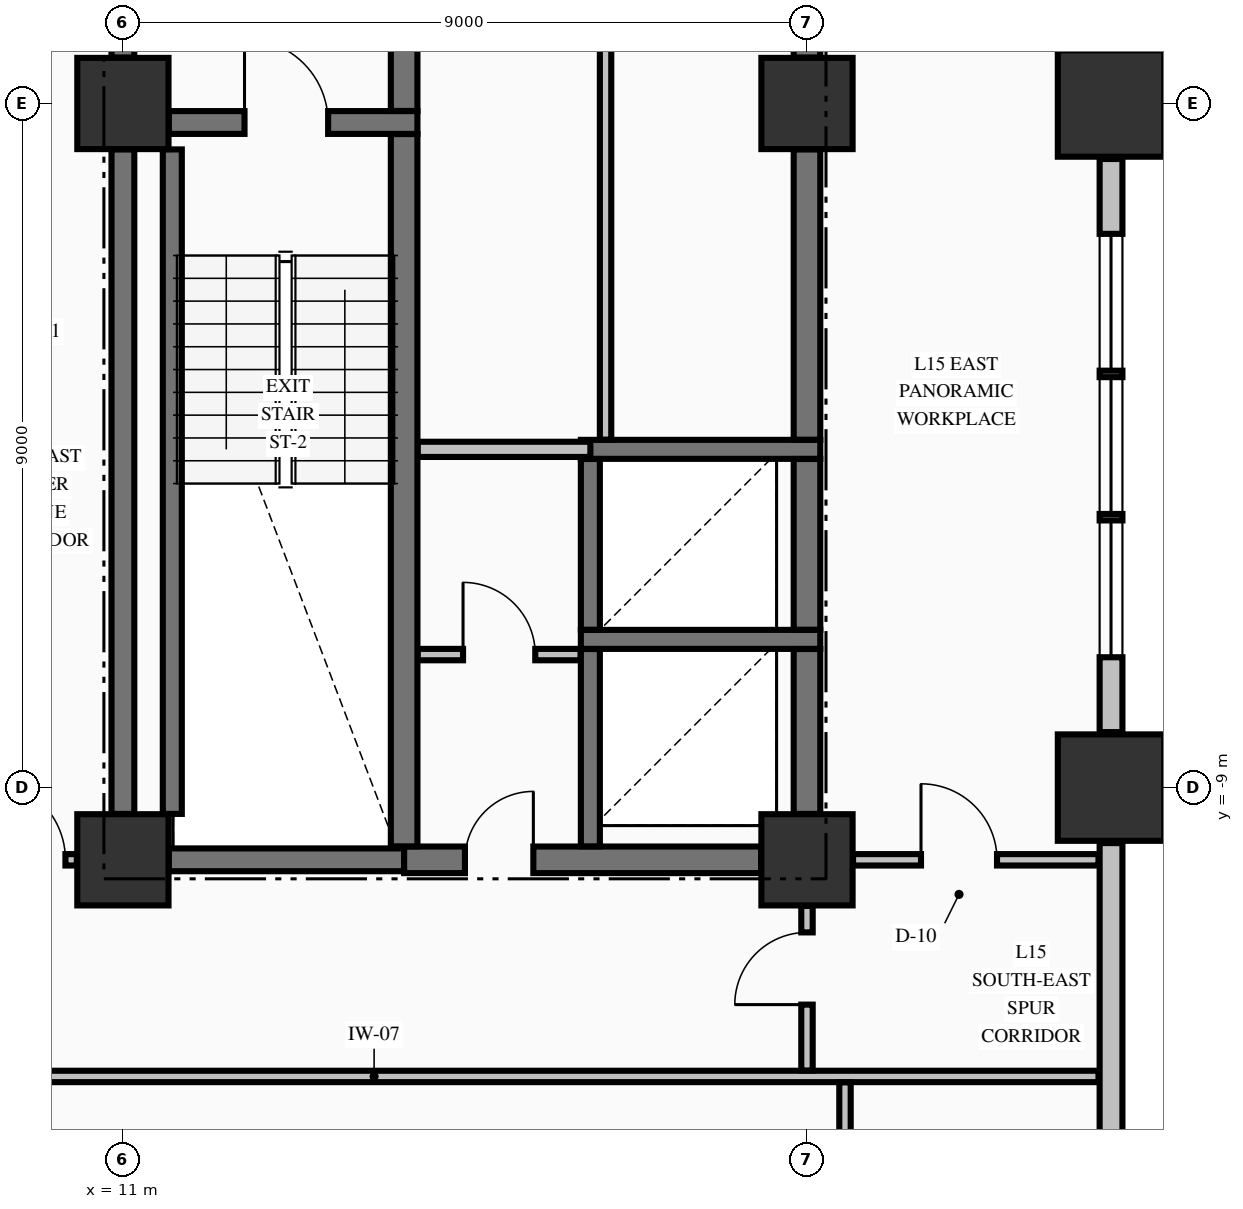
"""IFC4 building model, lengths in metres.
Left out: names, types, materials, properties, quantities, classifications, styles, units other than length and angle.
Written with IfcOpenShell. Run it as: python <this file> out.ifc"""

import sys

from ifc_helpers import new_model, si_unit, direction, frame, frame_2d, origin, origin_2d, place, context, subcontext, project, spatial, rectangle, extrude, element, fill, save


model = new_model("IFC4")
c1 = context("Model", 3, precision=1e-05, world=origin(), true_north=direction((0.0, 1.0)))
c2 = subcontext(c1, "Body", "Model", "MODEL_VIEW")
j1 = project(units=[si_unit("LENGTHUNIT", "METRE"), si_unit("PLANEANGLEUNIT", "RADIAN")], contexts=[c1])
p1 = place(None, origin())
s1 = spatial("IfcSite", under=j1, at=p1, CompositionType="ELEMENT")
p2 = place(p1, origin())
s2 = spatial("IfcBuilding", under=s1, at=p2, CompositionType="ELEMENT")
p3 = place(p2, frame((0.0, 0.0, 64.33)))
s3 = spatial("IfcBuildingStorey", under=s2, at=p3, CompositionType="ELEMENT", Elevation=64.33)
for number, where, z_axis, x_axis in (
    (1, (24.0, -9.0, -0.25), (0.0, 0.0, 1.0), (1.0, 0.0, 0.0)),
    (2, (24.0, 0.0, -0.25), (0.0, 0.0, 1.0), (1.0, 0.0, 0.0)),
):
    element("IfcColumn", number, at=place(p3, frame(where, z_axis=z_axis, x_axis=x_axis)), inside=s3, PredefinedType="COLUMN", context=c2, shape_type="SweptSolid", body=[
        extrude(rectangle(XDim=1.4, YDim=1.4, at=origin_2d()), origin(), (0.0, 0.0, 1.0), 3.57),
    ])
for number, where, z_axis, x_axis in (
    (3, (11.0, -9.95, -0.25), (0.0, 0.0, 1.0), (1.0, 0.0, 0.0)),
    (4, (11.0, 0.0, -0.25), (0.0, 0.0, 1.0), (1.0, 0.0, 0.0)),
    (5, (20.0, -9.95, -0.25), (0.0, 0.0, 1.0), (1.0, 0.0, 0.0)),
    (6, (20.0, 0.0, -0.25), (0.0, 0.0, 1.0), (1.0, 0.0, 0.0)),
):
    element("IfcColumn", number, at=place(p3, frame(where, z_axis=z_axis, x_axis=x_axis)), inside=s3, PredefinedType="COLUMN", context=c2, shape_type="SweptSolid", body=[
        extrude(rectangle(XDim=1.2, YDim=1.2, at=origin_2d()), origin(), (0.0, 0.0, 1.0), 3.57),
    ])
p4 = place(p3, frame((24.0, -22.27, 0.0), z_axis=(0.0, 0.0, 1.0), x_axis=(0.0, 1.0, 0.0)))
e7 = element("IfcWall", 7, at=p4, inside=s3, PredefinedType="STANDARD", context=c2, shape_type="SweptSolid", body=[
    extrude(rectangle(XDim=12.54, YDim=0.3, at=frame_2d((6.27, 0.0))), origin(), (0.0, 0.0, 1.0), 2.712),
])
p5 = place(p3, frame((24.0, -8.27, 0.0), z_axis=(0.0, 0.0, 1.0), x_axis=(0.0, 1.0, 0.0)))
e8 = element("IfcWall", 8, at=p5, inside=s3, PredefinedType="STANDARD", context=c2, shape_type="SweptSolid", body=[
    extrude(rectangle(XDim=7.54, YDim=0.3, at=frame_2d((3.77, 0.0))), origin(), (0.0, 0.0, 1.0), 2.712),
])
p6 = place(p5, frame((0.985, 0.0, 0.78)))
e9 = element("IfcOpeningElement", 9, at=p6, cuts=e8, PredefinedType="OPENING", context=c2, shape_type="SweptSolid", body=[
    extrude(rectangle(XDim=1.8, YDim=1.72, at=frame_2d((0.9, 0.86))), frame((0.0, 0.16, 0.0), z_axis=(0.0, -1.0, 0.0), x_axis=(1.0, 0.0, 0.0)), (0.0, 0.0, 1.0), 0.32),
])
p7 = place(p5, frame((2.87, 0.0, 0.78)))
e10 = element("IfcOpeningElement", 10, at=p7, cuts=e8, PredefinedType="OPENING", context=c2, shape_type="SweptSolid", body=[
    extrude(rectangle(XDim=1.8, YDim=1.72, at=frame_2d((0.9, 0.86))), frame((0.0, 0.16, 0.0), z_axis=(0.0, -1.0, 0.0), x_axis=(1.0, 0.0, 0.0)), (0.0, 0.0, 1.0), 0.32),
])
p8 = place(p5, frame((4.755, 0.0, 0.78)))
e11 = element("IfcOpeningElement", 11, at=p8, cuts=e8, PredefinedType="OPENING", context=c2, shape_type="SweptSolid", body=[
    extrude(rectangle(XDim=1.8, YDim=1.72, at=frame_2d((0.9, 0.86))), frame((0.0, 0.16, 0.0), z_axis=(0.0, -1.0, 0.0), x_axis=(1.0, 0.0, 0.0)), (0.0, 0.0, 1.0), 0.32),
])
p9 = place(p3, frame((11.604, -9.95, 0.0), z_axis=(0.0, 0.0, 1.0), x_axis=(1.0, 0.0, 0.0)))
e12 = element("IfcWall", 12, at=p9, inside=s3, PredefinedType="SHEAR", context=c2, shape_type="SweptSolid", body=[
    extrude(rectangle(XDim=3.096, YDim=0.3, at=frame_2d((1.548, 0.0))), origin(), (0.0, 0.0, 1.0), 3.32),
])
p10 = place(p3, frame((14.7, -9.95, 0.0), z_axis=(0.0, 0.0, 1.0), x_axis=(1.0, 0.0, 0.0)))
e13 = element("IfcWall", 13, at=p10, inside=s3, PredefinedType="SHEAR", context=c2, shape_type="SweptSolid", body=[
    extrude(rectangle(XDim=4.696, YDim=0.35, at=frame_2d((2.348, 0.0))), origin(), (0.0, 0.0, 1.0), 3.32),
])
p11 = place(p10, frame((0.8, 0.0, 0.0)))
e14 = element("IfcOpeningElement", 14, at=p11, cuts=e13, PredefinedType="OPENING", context=c2, shape_type="SweptSolid", body=[
    extrude(rectangle(XDim=0.9, YDim=2.15, at=frame_2d((0.45, 1.075))), frame((0.0, 0.185, 0.0), z_axis=(0.0, -1.0, 0.0), x_axis=(1.0, 0.0, 0.0)), (0.0, 0.0, 1.0), 0.37),
])
for number, where, z_axis, x_axis in (
    (15, (17.025, -7.05, 0.0), (0.0, 0.0, 1.0), (1.0, 0.0, 0.0)),
    (16, (17.025, -4.55, 0.0), (0.0, 0.0, 1.0), (1.0, 0.0, 0.0)),
):
    element("IfcWall", number, at=place(p3, frame(where, z_axis=z_axis, x_axis=x_axis)), inside=s3, PredefinedType="SOLIDWALL", context=c2, shape_type="SweptSolid", body=[
        extrude(rectangle(XDim=3.15, YDim=0.25, at=frame_2d((1.575, 0.0))), origin(), (0.0, 0.0, 1.0), 3.32),
    ])
p12 = place(p3, frame((11.604, -0.25, 0.0), z_axis=(0.0, 0.0, 1.0), x_axis=(1.0, 0.0, 0.0)))
e17 = element("IfcWall", 17, at=p12, inside=s3, PredefinedType="SHEAR", context=c2, shape_type="SweptSolid", body=[
    extrude(rectangle(XDim=3.271, YDim=0.3, at=frame_2d((1.635, 0.0))), origin(), (0.0, 0.0, 1.0), 3.32),
])
p13 = place(p12, frame((0.996, 0.0, 0.0)))
e18 = element("IfcOpeningElement", 18, at=p13, cuts=e17, PredefinedType="OPENING", context=c2, shape_type="SweptSolid", body=[
    extrude(rectangle(XDim=1.1, YDim=2.15, at=frame_2d((0.55, 1.075))), frame((0.0, 0.16, 0.0), z_axis=(0.0, -1.0, 0.0), x_axis=(1.0, 0.0, 0.0)), (0.0, 0.0, 1.0), 0.32),
])
p14 = place(p3, frame((-28.835, -12.8, 0.0), z_axis=(0.0, 0.0, 1.0), x_axis=(1.0, 0.0, 0.0)))
e19 = element("IfcWall", 19, at=p14, inside=s3, PredefinedType="PARTITIONING", context=c2, shape_type="SweptSolid", body=[
    extrude(rectangle(XDim=52.67, YDim=0.15, at=frame_2d((26.335, 0.0))), origin(), (0.0, 0.0, 1.0), 3.32),
])
p15 = place(p14, frame((13.81, 0.0, 0.0)))
e20 = element("IfcOpeningElement", 20, at=p15, cuts=e19, PredefinedType="OPENING", context=c2, shape_type="SweptSolid", body=[
    extrude(rectangle(XDim=1.05, YDim=2.15, at=frame_2d((0.525, 1.075))), frame((0.0, 0.085, 0.0), z_axis=(0.0, -1.0, 0.0), x_axis=(1.0, 0.0, 0.0)), (0.0, 0.0, 1.0), 0.17),
])
p16 = place(p14, frame((25.01, 0.0, 0.0)))
e21 = element("IfcOpeningElement", 21, at=p16, cuts=e19, PredefinedType="OPENING", context=c2, shape_type="SweptSolid", body=[
    extrude(rectangle(XDim=1.05, YDim=2.15, at=frame_2d((0.525, 1.075))), frame((0.0, 0.085, 0.0), z_axis=(0.0, -1.0, 0.0), x_axis=(1.0, 0.0, 0.0)), (0.0, 0.0, 1.0), 0.17),
])
p17 = place(p14, frame((32.56, 0.0, 0.0)))
e22 = element("IfcOpeningElement", 22, at=p17, cuts=e19, PredefinedType="OPENING", context=c2, shape_type="SweptSolid", body=[
    extrude(rectangle(XDim=1.05, YDim=2.15, at=frame_2d((0.525, 1.075))), frame((0.0, 0.085, 0.0), z_axis=(0.0, -1.0, 0.0), x_axis=(1.0, 0.0, 0.0)), (0.0, 0.0, 1.0), 0.17),
])
p18 = place(p3, frame((-10.394, -9.95, 0.0), z_axis=(0.0, 0.0, 1.0), x_axis=(1.0, 0.0, 0.0)))
e23 = element("IfcWall", 23, at=p18, inside=s3, PredefinedType="PARTITIONING", context=c2, shape_type="SweptSolid", body=[
    extrude(rectangle(XDim=20.788, YDim=0.15, at=frame_2d((10.394, 0.0))), origin(), (0.0, 0.0, 1.0), 3.32),
])
p19 = place(p18, frame((0.15, 0.0, 0.0)))
e24 = element("IfcOpeningElement", 24, at=p19, cuts=e23, PredefinedType="OPENING", context=c2, shape_type="SweptSolid", body=[
    extrude(rectangle(XDim=1.05, YDim=2.15, at=frame_2d((0.525, 1.075))), frame((0.0, 0.085, 0.0), z_axis=(0.0, -1.0, 0.0), x_axis=(1.0, 0.0, 0.0)), (0.0, 0.0, 1.0), 0.17),
])
p20 = place(p18, frame((19.588, 0.0, 0.0)))
e25 = element("IfcOpeningElement", 25, at=p20, cuts=e23, PredefinedType="OPENING", context=c2, shape_type="SweptSolid", body=[
    extrude(rectangle(XDim=1.05, YDim=2.15, at=frame_2d((0.525, 1.075))), frame((0.0, 0.085, 0.0), z_axis=(0.0, -1.0, 0.0), x_axis=(1.0, 0.0, 0.0)), (0.0, 0.0, 1.0), 0.17),
])
p21 = place(p18, frame((13.769, 0.0, 0.0)))
e26 = element("IfcOpeningElement", 26, at=p21, cuts=e23, PredefinedType="OPENING", context=c2, shape_type="SweptSolid", body=[
    extrude(rectangle(XDim=0.95, YDim=2.15, at=frame_2d((0.475, 1.075))), frame((0.0, 0.085, 0.0), z_axis=(0.0, -1.0, 0.0), x_axis=(1.0, 0.0, 0.0)), (0.0, 0.0, 1.0), 0.17),
])
p22 = place(p3, frame((20.606, -9.95, 0.0), z_axis=(0.0, 0.0, 1.0), x_axis=(1.0, 0.0, 0.0)))
e27 = element("IfcWall", 27, at=p22, inside=s3, PredefinedType="PARTITIONING", context=c2, shape_type="SweptSolid", body=[
    extrude(rectangle(XDim=3.229, YDim=0.15, at=frame_2d((1.615, 0.0))), origin(), (0.0, 0.0, 1.0), 3.32),
])
p23 = place(p22, frame((0.894, 0.0, 0.0)))
e28 = element("IfcOpeningElement", 28, at=p23, cuts=e27, PredefinedType="OPENING", context=c2, shape_type="SweptSolid", body=[
    extrude(rectangle(XDim=1.0, YDim=2.15, at=frame_2d((0.5, 1.075))), frame((0.0, 0.085, 0.0), z_axis=(0.0, -1.0, 0.0), x_axis=(1.0, 0.0, 0.0)), (0.0, 0.0, 1.0), 0.17),
])
p24 = place(p3, frame((14.878, -7.25, 0.0), z_axis=(0.0, 0.0, 1.0), x_axis=(1.0, 0.0, 0.0)))
e29 = element("IfcWall", 29, at=p24, inside=s3, PredefinedType="PARTITIONING", context=c2, shape_type="SweptSolid", body=[
    extrude(rectangle(XDim=2.144, YDim=0.15, at=frame_2d((1.072, 0.0))), origin(), (0.0, 0.0, 1.0), 3.32),
])
p25 = place(p24, frame((0.597, 0.0, 0.0)))
e30 = element("IfcOpeningElement", 30, at=p25, cuts=e29, PredefinedType="OPENING", context=c2, shape_type="SweptSolid", body=[
    extrude(rectangle(XDim=0.95, YDim=2.15, at=frame_2d((0.475, 1.075))), frame((0.0, 0.085, 0.0), z_axis=(0.0, -1.0, 0.0), x_axis=(1.0, 0.0, 0.0)), (0.0, 0.0, 1.0), 0.17),
])
p26 = place(p3, frame((14.878, -4.55, 0.0), z_axis=(0.0, 0.0, 1.0), x_axis=(1.0, 0.0, 0.0)))
e31 = element("IfcWall", 31, at=p26, inside=s3, PredefinedType="PARTITIONING", context=c2, shape_type="SweptSolid", body=[
    extrude(rectangle(XDim=2.272, YDim=0.2, at=frame_2d((1.136, 0.0))), origin(), (0.0, 0.0, 1.0), 3.32),
])
p27 = place(p3, frame((11.0, -9.346, 0.0), z_axis=(0.0, 0.0, 1.0), x_axis=(0.0, 1.0, 0.0)))
e32 = element("IfcWall", 32, at=p27, inside=s3, PredefinedType="SHEAR", context=c2, shape_type="SweptSolid", body=[
    extrude(rectangle(XDim=8.742, YDim=0.3, at=frame_2d((4.371, 0.0))), origin(), (0.0, 0.0, 1.0), 3.32),
])
p28 = place(p3, frame((11.0, 0.604, 0.0), z_axis=(0.0, 0.0, 1.0), x_axis=(0.0, 1.0, 0.0)))
e33 = element("IfcWall", 33, at=p28, inside=s3, PredefinedType="SHEAR", context=c2, shape_type="SweptSolid", body=[
    extrude(rectangle(XDim=2.144, YDim=0.3, at=frame_2d((1.072, 0.0))), origin(), (0.0, 0.0, 1.0), 3.32),
])
p29 = place(p28, frame((0.496, 0.0, 0.0)))
e34 = element("IfcOpeningElement", 34, at=p29, cuts=e33, PredefinedType="OPENING", context=c2, shape_type="SweptSolid", body=[
    extrude(rectangle(XDim=1.1, YDim=2.15, at=frame_2d((0.55, 1.075))), frame((0.0, 0.16, 0.0), z_axis=(0.0, -1.0, 0.0), x_axis=(1.0, 0.0, 0.0)), (0.0, 0.0, 1.0), 0.32),
])
p30 = place(p3, frame((11.65, -9.346, 0.0), z_axis=(0.0, 0.0, 1.0), x_axis=(0.0, 1.0, 0.0)))
e35 = element("IfcWall", 35, at=p30, inside=s3, PredefinedType="SOLIDWALL", context=c2, shape_type="SweptSolid", body=[
    extrude(rectangle(XDim=8.742, YDim=0.25, at=frame_2d((4.371, 0.0))), origin(), (0.0, 0.0, 1.0), 3.32),
])
p31 = place(p3, frame((14.7, -9.773, 0.0), z_axis=(0.0, 0.0, 1.0), x_axis=(0.0, 1.0, 0.0)))
e36 = element("IfcWall", 36, at=p31, inside=s3, PredefinedType="SHEAR", context=c2, shape_type="SweptSolid", body=[
    extrude(rectangle(XDim=9.371, YDim=0.35, at=frame_2d((4.686, 0.0))), origin(), (0.0, 0.0, 1.0), 3.32),
])
p32 = place(p3, frame((14.7, -0.098, 0.0), z_axis=(0.0, 0.0, 1.0), x_axis=(0.0, 1.0, 0.0)))
e37 = element("IfcWall", 37, at=p32, inside=s3, PredefinedType="SHEAR", context=c2, shape_type="SweptSolid", body=[
    extrude(rectangle(XDim=2.846, YDim=0.35, at=frame_2d((1.423, 0.0))), origin(), (0.0, 0.0, 1.0), 3.32),
])
p33 = place(p3, frame((17.15, -9.773, 0.0), z_axis=(0.0, 0.0, 1.0), x_axis=(0.0, 1.0, 0.0)))
e38 = element("IfcWall", 38, at=p33, inside=s3, PredefinedType="SOLIDWALL", context=c2, shape_type="SweptSolid", body=[
    extrude(rectangle(XDim=2.596, YDim=0.25, at=frame_2d((1.298, 0.0))), origin(), (0.0, 0.0, 1.0), 3.32),
])
p34 = place(p3, frame((17.15, -6.923, 0.0), z_axis=(0.0, 0.0, 1.0), x_axis=(0.0, 1.0, 0.0)))
e39 = element("IfcWall", 39, at=p34, inside=s3, PredefinedType="SOLIDWALL", context=c2, shape_type="SweptSolid", body=[
    extrude(rectangle(XDim=2.246, YDim=0.25, at=frame_2d((1.123, 0.0))), origin(), (0.0, 0.0, 1.0), 3.32),
])
p35 = place(p3, frame((20.0, -9.346, 0.0), z_axis=(0.0, 0.0, 1.0), x_axis=(0.0, 1.0, 0.0)))
e40 = element("IfcWall", 40, at=p35, inside=s3, PredefinedType="SHEAR", context=c2, shape_type="SweptSolid", body=[
    extrude(rectangle(XDim=2.169, YDim=0.35, at=frame_2d((1.084, 0.0))), origin(), (0.0, 0.0, 1.0), 3.32),
])
p36 = place(p3, frame((20.0, -6.923, 0.0), z_axis=(0.0, 0.0, 1.0), x_axis=(0.0, 1.0, 0.0)))
e41 = element("IfcWall", 41, at=p36, inside=s3, PredefinedType="SHEAR", context=c2, shape_type="SweptSolid", body=[
    extrude(rectangle(XDim=2.246, YDim=0.35, at=frame_2d((1.123, 0.0))), origin(), (0.0, 0.0, 1.0), 3.32),
])
p37 = place(p3, frame((20.0, -4.423, 0.0), z_axis=(0.0, 0.0, 1.0), x_axis=(0.0, 1.0, 0.0)))
e42 = element("IfcWall", 42, at=p37, inside=s3, PredefinedType="SHEAR", context=c2, shape_type="SweptSolid", body=[
    extrude(rectangle(XDim=3.819, YDim=0.35, at=frame_2d((1.91, 0.0))), origin(), (0.0, 0.0, 1.0), 3.32),
])
p38 = place(p3, frame((20.0, 0.604, 0.0), z_axis=(0.0, 0.0, 1.0), x_axis=(0.0, 1.0, 0.0)))
e43 = element("IfcWall", 43, at=p38, inside=s3, PredefinedType="SHEAR", context=c2, shape_type="SweptSolid", body=[
    extrude(rectangle(XDim=9.292, YDim=0.35, at=frame_2d((4.646, 0.0))), origin(), (0.0, 0.0, 1.0), 3.32),
])
p39 = place(p3, frame((17.35, -4.422, 0.0), z_axis=(0.0, 0.0, 1.0), x_axis=(0.0, 1.0, 0.0)))
e44 = element("IfcWall", 44, at=p39, inside=s3, PredefinedType="PARTITIONING", context=c2, shape_type="SweptSolid", body=[
    extrude(rectangle(XDim=14.744, YDim=0.15, at=frame_2d((7.372, 0.0))), origin(), (0.0, 0.0, 1.0), 3.32),
])
p40 = place(p3, frame((20.0, -12.722, 0.0), z_axis=(0.0, 0.0, 1.0), x_axis=(0.0, 1.0, 0.0)))
e45 = element("IfcWall", 45, at=p40, inside=s3, PredefinedType="PARTITIONING", context=c2, shape_type="SweptSolid", body=[
    extrude(rectangle(XDim=2.166, YDim=0.15, at=frame_2d((1.083, 0.0))), origin(), (0.0, 0.0, 1.0), 3.32),
])
p41 = place(p40, frame((0.867, 0.0, 0.0)))
e46 = element("IfcOpeningElement", 46, at=p41, cuts=e45, PredefinedType="OPENING", context=c2, shape_type="SweptSolid", body=[
    extrude(rectangle(XDim=0.95, YDim=2.15, at=frame_2d((0.475, 1.075))), frame((0.0, 0.085, 0.0), z_axis=(0.0, -1.0, 0.0), x_axis=(1.0, 0.0, 0.0)), (0.0, 0.0, 1.0), 0.17),
])
p42 = place(p3, frame((20.5, -22.294, 0.0), z_axis=(0.0, 0.0, 1.0), x_axis=(0.0, 1.0, 0.0)))
e47 = element("IfcWall", 47, at=p42, inside=s3, PredefinedType="PARTITIONING", context=c2, shape_type="SweptSolid", body=[
    extrude(rectangle(XDim=9.416, YDim=0.15, at=frame_2d((4.708, 0.0))), origin(), (0.0, 0.0, 1.0), 3.32),
])
p43 = place(p6, origin())
e48 = element("IfcWindow", 48, at=p43, inside=s3, PartitioningType="SINGLE_PANEL", PredefinedType="WINDOW", context=c2, shape_type="SweptSolid", body=[
    extrude(rectangle(XDim=1.8, YDim=1.72, at=frame_2d((0.9, 0.86))), frame((0.0, 0.03, 0.0), z_axis=(0.0, -1.0, 0.0), x_axis=(1.0, 0.0, 0.0)), (0.0, 0.0, 1.0), 0.06),
])
fill(e9, e48)
p44 = place(p7, origin())
e49 = element("IfcWindow", 49, at=p44, inside=s3, PartitioningType="SINGLE_PANEL", PredefinedType="WINDOW", context=c2, shape_type="SweptSolid", body=[
    extrude(rectangle(XDim=1.8, YDim=1.72, at=frame_2d((0.9, 0.86))), frame((0.0, 0.03, 0.0), z_axis=(0.0, -1.0, 0.0), x_axis=(1.0, 0.0, 0.0)), (0.0, 0.0, 1.0), 0.06),
])
fill(e10, e49)
p45 = place(p8, origin())
e50 = element("IfcWindow", 50, at=p45, inside=s3, PartitioningType="SINGLE_PANEL", PredefinedType="WINDOW", context=c2, shape_type="SweptSolid", body=[
    extrude(rectangle(XDim=1.8, YDim=1.72, at=frame_2d((0.9, 0.86))), frame((0.0, 0.03, 0.0), z_axis=(0.0, -1.0, 0.0), x_axis=(1.0, 0.0, 0.0)), (0.0, 0.0, 1.0), 0.06),
])
fill(e11, e50)
p46 = place(p13, origin())
e51 = element("IfcDoor", 51, at=p46, inside=s3, OperationType="SINGLE_SWING_LEFT", PredefinedType="DOOR", context=c2, shape_type="SweptSolid", body=[
    extrude(rectangle(XDim=1.1, YDim=2.15, at=frame_2d((0.55, 1.075))), frame((0.0, 0.025, 0.0), z_axis=(0.0, -1.0, 0.0), x_axis=(1.0, 0.0, 0.0)), (0.0, 0.0, 1.0), 0.05),
])
fill(e18, e51)
p47 = place(p11, origin())
e52 = element("IfcDoor", 52, at=p47, inside=s3, OperationType="SINGLE_SWING_RIGHT", PredefinedType="DOOR", context=c2, shape_type="SweptSolid", body=[
    extrude(rectangle(XDim=0.9, YDim=2.15, at=frame_2d((0.45, 1.075))), frame((0.0, 0.025, 0.0), z_axis=(0.0, -1.0, 0.0), x_axis=(1.0, 0.0, 0.0)), (0.0, 0.0, 1.0), 0.05),
])
fill(e14, e52)
p48 = place(p25, origin())
e53 = element("IfcDoor", 53, at=p48, inside=s3, OperationType="SINGLE_SWING_LEFT", PredefinedType="DOOR", context=c2, shape_type="SweptSolid", body=[
    extrude(rectangle(XDim=0.95, YDim=2.15, at=frame_2d((0.475, 1.075))), frame((0.0, 0.025, 0.0), z_axis=(0.0, -1.0, 0.0), x_axis=(1.0, 0.0, 0.0)), (0.0, 0.0, 1.0), 0.05),
])
fill(e30, e53)
p49 = place(p20, origin())
e54 = element("IfcDoor", 54, at=p49, inside=s3, OperationType="SINGLE_SWING_LEFT", PredefinedType="DOOR", context=c2, shape_type="SweptSolid", body=[
    extrude(rectangle(XDim=1.05, YDim=2.15, at=frame_2d((0.525, 1.075))), frame((0.0, 0.025, 0.0), z_axis=(0.0, -1.0, 0.0), x_axis=(1.0, 0.0, 0.0)), (0.0, 0.0, 1.0), 0.05),
])
fill(e25, e54)
p50 = place(p41, origin())
e55 = element("IfcDoor", 55, at=p50, inside=s3, OperationType="SINGLE_SWING_LEFT", PredefinedType="DOOR", context=c2, shape_type="SweptSolid", body=[
    extrude(rectangle(XDim=0.95, YDim=2.15, at=frame_2d((0.475, 1.075))), frame((0.0, 0.025, 0.0), z_axis=(0.0, -1.0, 0.0), x_axis=(1.0, 0.0, 0.0)), (0.0, 0.0, 1.0), 0.05),
])
fill(e46, e55)
p51 = place(p23, origin())
e56 = element("IfcDoor", 56, at=p51, inside=s3, OperationType="SINGLE_SWING_LEFT", PredefinedType="DOOR", context=c2, shape_type="SweptSolid", body=[
    extrude(rectangle(XDim=1.0, YDim=2.15, at=frame_2d((0.5, 1.075))), frame((0.0, 0.025, 0.0), z_axis=(0.0, -1.0, 0.0), x_axis=(1.0, 0.0, 0.0)), (0.0, 0.0, 1.0), 0.05),
])
fill(e28, e56)
save(model, sys.argv[1])
